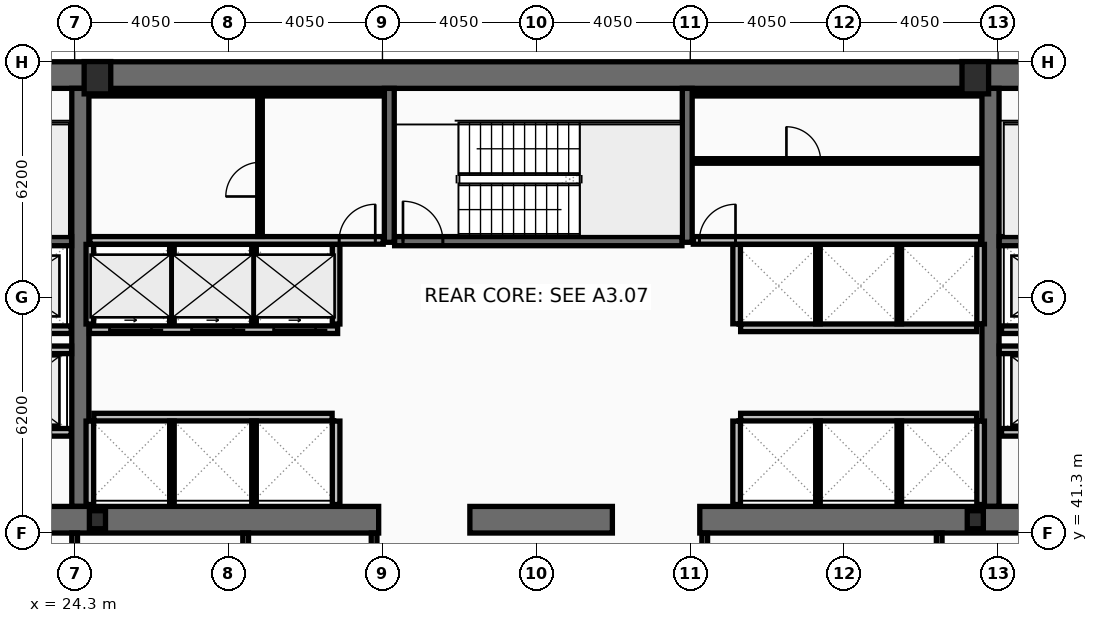
"""IFC4 building model, lengths in metres.
Left out: names, types, materials, properties, quantities, classifications, styles, units other than length and angle.
Written with IfcOpenShell. Run it as: python <this file> out.ifc"""

import sys

from ifc_helpers import new_model, si_unit, direction, frame, frame_2d, origin, origin_2d, place, context, subcontext, project, spatial, rectangle, hollow_rectangle, i_section, extrude, element, fill, save


model = new_model("IFC4")
c1 = context("Model", 3, precision=1e-05, world=origin(), true_north=direction((0.0, 1.0)))
c2 = subcontext(c1, "Body", "Model", "MODEL_VIEW")
j1 = project(units=[si_unit("LENGTHUNIT", "METRE"), si_unit("PLANEANGLEUNIT", "RADIAN")], contexts=[c1])
p1 = place(None, origin())
s1 = spatial("IfcSite", under=j1, at=p1, CompositionType="ELEMENT")
p2 = place(p1, origin())
s2 = spatial("IfcBuilding", under=s1, at=p2, CompositionType="ELEMENT")
p3 = place(p2, frame((0.0, 0.0, 98.6)))
s3 = spatial("IfcBuildingStorey", under=s2, at=p3, CompositionType="ELEMENT", Elevation=98.6)
p4 = place(p3, frame((16.2, 53.35, 0.0), z_axis=(0.0, 0.0, 1.0), x_axis=(1.0, 0.0, 0.0)))
e1 = element("IfcWall", 1, at=p4, inside=s3, PredefinedType="SHEAR", context=c2, shape_type="SweptSolid", body=[
    extrude(rectangle(XDim=40.5, YDim=0.7, at=frame_2d((20.25, 0.0))), origin(), (0.0, 0.0, 1.0), 3.82),
])
for number, where, z_axis, x_axis in (
    (2, (24.45, 42.0, 0.0), (0.0, 0.0, 1.0), (0.0, 1.0, 0.0)),
    (3, (48.4, 42.0, 0.0), (0.0, 0.0, 1.0), (0.0, 1.0, 0.0)),
):
    element("IfcWall", number, at=place(p3, frame(where, z_axis=z_axis, x_axis=x_axis)), inside=s3, PredefinedType="SHEAR", context=c2, shape_type="SweptSolid", body=[
        extrude(rectangle(XDim=11.0, YDim=0.45, at=frame_2d((5.5, 0.0))), origin(), (0.0, 0.0, 1.0), 3.82),
    ])
p5 = place(p3, frame((32.3, 41.65, 0.0), z_axis=(0.0, 0.0, 1.0), x_axis=(-1.0, 0.0, 0.0)))
e4 = element("IfcWall", 4, at=p5, inside=s3, PredefinedType="SHEAR", context=c2, shape_type="SweptSolid", body=[
    extrude(rectangle(XDim=11.45, YDim=0.7, at=frame_2d((5.725, 0.0))), origin(), (0.0, 0.0, 1.0), 3.82),
])
p6 = place(p3, frame((38.45, 41.65, 0.0), z_axis=(0.0, 0.0, 1.0), x_axis=(-1.0, 0.0, 0.0)))
e5 = element("IfcWall", 5, at=p6, inside=s3, PredefinedType="SHEAR", context=c2, shape_type="SweptSolid", body=[
    extrude(rectangle(XDim=3.75, YDim=0.7, at=frame_2d((1.875, 0.0))), origin(), (0.0, 0.0, 1.0), 3.82),
])
p7 = place(p3, frame((52.05, 41.65, 0.0), z_axis=(0.0, 0.0, 1.0), x_axis=(-1.0, 0.0, 0.0)))
e6 = element("IfcWall", 6, at=p7, inside=s3, PredefinedType="SHEAR", context=c2, shape_type="SweptSolid", body=[
    extrude(rectangle(XDim=11.3, YDim=0.7, at=frame_2d((5.65, 0.0))), origin(), (0.0, 0.0, 1.0), 3.82),
])
for number, where, z_axis, x_axis in (
    (7, (32.58, 48.95, 0.0), (0.0, 0.0, 1.0), (0.0, 1.0, 0.0)),
    (8, (40.42, 48.95, 0.0), (0.0, 0.0, 1.0), (0.0, 1.0, 0.0)),
):
    element("IfcWall", number, at=place(p3, frame(where, z_axis=z_axis, x_axis=x_axis)), inside=s3, PredefinedType="SHEAR", context=c2, shape_type="SweptSolid", body=[
        extrude(rectangle(XDim=4.05, YDim=0.26, at=frame_2d((2.025, 0.0))), origin(), (0.0, 0.0, 1.0), 3.82),
    ])
p8 = place(p3, frame((16.9, 48.98, 0.0), z_axis=(0.0, 0.0, 1.0), x_axis=(1.0, 0.0, 0.0)))
e9 = element("IfcWall", 9, at=p8, inside=s3, PredefinedType="SHEAR", context=c2, shape_type="SweptSolid", body=[
    extrude(rectangle(XDim=7.32, YDim=0.24, at=frame_2d((3.66, 0.0))), origin(), (0.0, 0.0, 1.0), 3.82),
])
p9 = place(p8, frame((0.22, 0.0, 0.0)))
e10 = element("IfcOpeningElement", 10, at=p9, cuts=e9, PredefinedType="OPENING", context=c2, shape_type="SweptSolid", body=[
    extrude(rectangle(XDim=1.05, YDim=2.15, at=frame_2d((0.525, 1.075))), frame((0.0, 0.13, 0.0), z_axis=(0.0, -1.0, 0.0), x_axis=(1.0, 0.0, 0.0)), (0.0, 0.0, 1.0), 0.26),
])
p10 = place(p3, frame((48.63, 48.98, 0.0), z_axis=(0.0, 0.0, 1.0), x_axis=(1.0, 0.0, 0.0)))
e11 = element("IfcWall", 11, at=p10, inside=s3, PredefinedType="SHEAR", context=c2, shape_type="SweptSolid", body=[
    extrude(rectangle(XDim=7.37, YDim=0.24, at=frame_2d((3.685, 0.0))), origin(), (0.0, 0.0, 1.0), 3.82),
])
p11 = place(p10, frame((6.1, 0.0, 0.0)))
e12 = element("IfcOpeningElement", 12, at=p11, cuts=e11, PredefinedType="OPENING", context=c2, shape_type="SweptSolid", body=[
    extrude(rectangle(XDim=1.05, YDim=2.15, at=frame_2d((0.525, 1.075))), frame((0.0, 0.13, 0.0), z_axis=(0.0, -1.0, 0.0), x_axis=(1.0, 0.0, 0.0)), (0.0, 0.0, 1.0), 0.26),
])
p12 = place(p3, frame((32.72, 48.98, 0.0), z_axis=(0.0, 0.0, 1.0), x_axis=(1.0, 0.0, 0.0)))
e13 = element("IfcWall", 13, at=p12, inside=s3, PredefinedType="SHEAR", context=c2, shape_type="SweptSolid", body=[
    extrude(rectangle(XDim=7.56, YDim=0.24, at=frame_2d((3.78, 0.0))), origin(), (0.0, 0.0, 1.0), 3.82),
])
p13 = place(p12, frame((0.22, 0.0, 0.0)))
e14 = element("IfcOpeningElement", 14, at=p13, cuts=e13, PredefinedType="OPENING", context=c2, shape_type="SweptSolid", body=[
    extrude(rectangle(XDim=1.05, YDim=2.15, at=frame_2d((0.525, 1.075))), frame((0.0, 0.13, 0.0), z_axis=(0.0, -1.0, 0.0), x_axis=(1.0, 0.0, 0.0)), (0.0, 0.0, 1.0), 0.26),
])
for number, where, z_axis, x_axis in (
    (15, (24.9, 53.28, 0.0), (0.0, 0.0, 1.0), (1.0, 0.0, 0.0)),
    (16, (48.0, 53.28, 0.0), (0.0, 0.0, 1.0), (1.0, 0.0, 0.0)),
):
    element("IfcColumn", number, at=place(p3, frame(where, z_axis=z_axis, x_axis=x_axis)), inside=s3, PredefinedType="COLUMN", context=c2, shape_type="SweptSolid", body=[
        extrude(hollow_rectangle(XDim=0.7, YDim=0.85, WallThickness=0.05, at=origin_2d()), origin(), (0.0, 0.0, 1.0), 4.0),
    ])
for number, where, z_axis, x_axis in (
    (17, (24.9, 41.65, 0.0), (0.0, 0.0, 1.0), (1.0, 0.0, 0.0)),
    (18, (48.0, 41.65, 0.0), (0.0, 0.0, 1.0), (1.0, 0.0, 0.0)),
):
    element("IfcColumn", number, at=place(p3, frame(where, z_axis=z_axis, x_axis=x_axis)), inside=s3, PredefinedType="COLUMN", context=c2, shape_type="SweptSolid", body=[
        extrude(i_section(OverallWidth=0.424, OverallDepth=0.474, WebThickness=0.048, FlangeThickness=0.077, at=origin_2d()), origin(), (0.0, 0.0, 1.0), 4.0),
    ])
p14 = place(p3, frame((51.61, 43.95, 0.0), z_axis=(0.0, 0.0, 1.0), x_axis=(-1.0, 0.0, 0.0)))
e19 = element("IfcWall", 19, at=p14, inside=s3, PredefinedType="PARTITIONING", context=c2, shape_type="SweptSolid", body=[
    extrude(rectangle(XDim=2.92, YDim=0.2, at=frame_2d((1.46, 0.0))), origin(), (0.0, 0.0, 1.0), 3.82),
])
p15 = place(p14, frame((0.81, 0.0, 0.0)))
e20 = element("IfcOpeningElement", 20, at=p15, cuts=e19, PredefinedType="OPENING", context=c2, shape_type="SweptSolid", body=[
    extrude(rectangle(XDim=1.3, YDim=2.18, at=frame_2d((0.65, 1.09))), frame((0.0, 0.11, 0.0), z_axis=(0.0, -1.0, 0.0), x_axis=(1.0, 0.0, 0.0)), (0.0, 0.0, 1.0), 0.22),
])
p16 = place(p3, frame((24.21, 43.95, 0.0), z_axis=(0.0, 0.0, 1.0), x_axis=(-1.0, 0.0, 0.0)))
e21 = element("IfcWall", 21, at=p16, inside=s3, PredefinedType="PARTITIONING", context=c2, shape_type="SweptSolid", body=[
    extrude(rectangle(XDim=2.97, YDim=0.2, at=frame_2d((1.485, 0.0))), origin(), (0.0, 0.0, 1.0), 3.82),
])
p17 = place(p16, frame((0.86, 0.0, 0.0)))
e22 = element("IfcOpeningElement", 22, at=p17, cuts=e21, PredefinedType="OPENING", context=c2, shape_type="SweptSolid", body=[
    extrude(rectangle(XDim=1.3, YDim=2.18, at=frame_2d((0.65, 1.09))), frame((0.0, 0.11, 0.0), z_axis=(0.0, -1.0, 0.0), x_axis=(1.0, 0.0, 0.0)), (0.0, 0.0, 1.0), 0.22),
])
p18 = place(p3, frame((51.61, 46.65, 0.0), z_axis=(0.0, 0.0, 1.0), x_axis=(-1.0, 0.0, 0.0)))
e23 = element("IfcWall", 23, at=p18, inside=s3, PredefinedType="PARTITIONING", context=c2, shape_type="SweptSolid", body=[
    extrude(rectangle(XDim=2.92, YDim=0.2, at=frame_2d((1.46, 0.0))), origin(), (0.0, 0.0, 1.0), 3.82),
])
p19 = place(p18, frame((0.86, 0.0, 0.0)))
e24 = element("IfcOpeningElement", 24, at=p19, cuts=e23, PredefinedType="OPENING", context=c2, shape_type="SweptSolid", body=[
    extrude(rectangle(XDim=1.2, YDim=2.18, at=frame_2d((0.6, 1.09))), frame((0.0, 0.11, 0.0), z_axis=(0.0, -1.0, 0.0), x_axis=(1.0, 0.0, 0.0)), (0.0, 0.0, 1.0), 0.22),
])
p20 = place(p3, frame((24.21, 46.65, 0.0), z_axis=(0.0, 0.0, 1.0), x_axis=(-1.0, 0.0, 0.0)))
e25 = element("IfcWall", 25, at=p20, inside=s3, PredefinedType="PARTITIONING", context=c2, shape_type="SweptSolid", body=[
    extrude(rectangle(XDim=2.97, YDim=0.2, at=frame_2d((1.485, 0.0))), origin(), (0.0, 0.0, 1.0), 3.82),
])
p21 = place(p20, frame((0.91, 0.0, 0.0)))
e26 = element("IfcOpeningElement", 26, at=p21, cuts=e25, PredefinedType="OPENING", context=c2, shape_type="SweptSolid", body=[
    extrude(rectangle(XDim=1.2, YDim=2.18, at=frame_2d((0.6, 1.09))), frame((0.0, 0.11, 0.0), z_axis=(0.0, -1.0, 0.0), x_axis=(1.0, 0.0, 0.0)), (0.0, 0.0, 1.0), 0.22),
])
p22 = place(p3, frame((31.22, 46.65, 0.0), z_axis=(0.0, 0.0, 1.0), x_axis=(-1.0, 0.0, 0.0)))
e27 = element("IfcWall", 27, at=p22, inside=s3, PredefinedType="PARTITIONING", context=c2, shape_type="SweptSolid", body=[
    extrude(rectangle(XDim=6.53, YDim=0.2, at=frame_2d((3.265, 0.0))), origin(), (0.0, 0.0, 1.0), 3.82),
])
p23 = place(p22, frame((4.9, 0.0, 0.0)))
e28 = element("IfcOpeningElement", 28, at=p23, cuts=e27, PredefinedType="OPENING", context=c2, shape_type="SweptSolid", body=[
    extrude(rectangle(XDim=1.1, YDim=2.18, at=frame_2d((0.55, 1.09))), frame((0.0, 0.11, 0.0), z_axis=(0.0, -1.0, 0.0), x_axis=(1.0, 0.0, 0.0)), (0.0, 0.0, 1.0), 0.22),
])
p24 = place(p22, frame((2.74, 0.0, 0.0)))
e29 = element("IfcOpeningElement", 29, at=p24, cuts=e27, PredefinedType="OPENING", context=c2, shape_type="SweptSolid", body=[
    extrude(rectangle(XDim=1.1, YDim=2.18, at=frame_2d((0.55, 1.09))), frame((0.0, 0.11, 0.0), z_axis=(0.0, -1.0, 0.0), x_axis=(1.0, 0.0, 0.0)), (0.0, 0.0, 1.0), 0.22),
])
p25 = place(p22, frame((0.58, 0.0, 0.0)))
e30 = element("IfcOpeningElement", 30, at=p25, cuts=e27, PredefinedType="OPENING", context=c2, shape_type="SweptSolid", body=[
    extrude(rectangle(XDim=1.1, YDim=2.18, at=frame_2d((0.55, 1.09))), frame((0.0, 0.11, 0.0), z_axis=(0.0, -1.0, 0.0), x_axis=(1.0, 0.0, 0.0)), (0.0, 0.0, 1.0), 0.22),
])
p26 = place(p3, frame((21.2, 46.12, 0.0), z_axis=(0.0, 0.0, 1.0), x_axis=(1.0, 0.0, 0.0)))
e31 = element("IfcWall", 31, at=p26, inside=s3, PredefinedType="PARTITIONING", context=c2, shape_type="SweptSolid", body=[
    extrude(rectangle(XDim=3.02, YDim=0.2, at=frame_2d((1.51, 0.0))), origin(), (0.0, 0.0, 1.0), 3.82),
])
p27 = place(p3, frame((48.63, 46.12, 0.0), z_axis=(0.0, 0.0, 1.0), x_axis=(1.0, 0.0, 0.0)))
e32 = element("IfcWall", 32, at=p27, inside=s3, PredefinedType="PARTITIONING", context=c2, shape_type="SweptSolid", body=[
    extrude(rectangle(XDim=3.07, YDim=0.2, at=frame_2d((1.535, 0.0))), origin(), (0.0, 0.0, 1.0), 3.82),
])
for number, where, z_axis, x_axis in (
    (33, (24.7, 46.8, 0.0), (0.0, 0.0, 1.0), (0.0, 1.0, 0.0)),
    (34, (31.18, 46.8, 0.0), (0.0, 0.0, 1.0), (0.0, 1.0, 0.0)),
):
    element("IfcWall", number, at=place(p3, frame(where, z_axis=z_axis, x_axis=x_axis)), inside=s3, PredefinedType="PARTITIONING", context=c2, shape_type="SweptSolid", body=[
        extrude(rectangle(XDim=2.095, YDim=0.2, at=frame_2d((1.047, 0.0))), origin(), (0.0, 0.0, 1.0), 3.82),
    ])
for number, where, z_axis, x_axis in (
    (35, (26.86, 46.8, 0.0), (0.0, 0.0, 1.0), (0.0, 1.0, 0.0)),
    (36, (29.02, 46.8, 0.0), (0.0, 0.0, 1.0), (0.0, 1.0, 0.0)),
):
    element("IfcWall", number, at=place(p3, frame(where, z_axis=z_axis, x_axis=x_axis)), inside=s3, PredefinedType="PARTITIONING", context=c2, shape_type="SweptSolid", body=[
        extrude(rectangle(XDim=2.095, YDim=0.12, at=frame_2d((1.047, 0.0))), origin(), (0.0, 0.0, 1.0), 3.82),
    ])
p28 = place(p3, frame((24.805, 44.35, 0.0), z_axis=(0.0, 0.0, 1.0), x_axis=(1.0, 0.0, 0.0)))
e37 = element("IfcWall", 37, at=p28, inside=s3, PredefinedType="PARTITIONING", context=c2, shape_type="SweptSolid", body=[
    extrude(rectangle(XDim=6.27, YDim=0.2, at=frame_2d((3.135, 0.0))), origin(), (0.0, 0.0, 1.0), 3.82),
])
for number, where, z_axis, x_axis in (
    (38, (24.7, 42.05, 0.0), (0.0, 0.0, 1.0), (0.0, 1.0, 0.0)),
    (39, (31.18, 42.05, 0.0), (0.0, 0.0, 1.0), (0.0, 1.0, 0.0)),
):
    element("IfcWall", number, at=place(p3, frame(where, z_axis=z_axis, x_axis=x_axis)), inside=s3, PredefinedType="PARTITIONING", context=c2, shape_type="SweptSolid", body=[
        extrude(rectangle(XDim=2.195, YDim=0.2, at=frame_2d((1.098, 0.0))), origin(), (0.0, 0.0, 1.0), 3.82),
    ])
for number, where, z_axis, x_axis in (
    (40, (26.86, 42.05, 0.0), (0.0, 0.0, 1.0), (0.0, 1.0, 0.0)),
    (41, (29.02, 42.05, 0.0), (0.0, 0.0, 1.0), (0.0, 1.0, 0.0)),
):
    element("IfcWall", number, at=place(p3, frame(where, z_axis=z_axis, x_axis=x_axis)), inside=s3, PredefinedType="PARTITIONING", context=c2, shape_type="SweptSolid", body=[
        extrude(rectangle(XDim=2.195, YDim=0.12, at=frame_2d((1.098, 0.0))), origin(), (0.0, 0.0, 1.0), 3.82),
    ])
p29 = place(p3, frame((41.825, 46.7, 0.0), z_axis=(0.0, 0.0, 1.0), x_axis=(1.0, 0.0, 0.0)))
e42 = element("IfcWall", 42, at=p29, inside=s3, PredefinedType="PARTITIONING", context=c2, shape_type="SweptSolid", body=[
    extrude(rectangle(XDim=6.21, YDim=0.2, at=frame_2d((3.105, 0.0))), origin(), (0.0, 0.0, 1.0), 3.82),
])
for number, where, z_axis, x_axis in (
    (43, (41.72, 46.805, 0.0), (0.0, 0.0, 1.0), (0.0, 1.0, 0.0)),
    (44, (48.14, 46.805, 0.0), (0.0, 0.0, 1.0), (0.0, 1.0, 0.0)),
):
    element("IfcWall", number, at=place(p3, frame(where, z_axis=z_axis, x_axis=x_axis)), inside=s3, PredefinedType="PARTITIONING", context=c2, shape_type="SweptSolid", body=[
        extrude(rectangle(XDim=2.09, YDim=0.2, at=frame_2d((1.045, 0.0))), origin(), (0.0, 0.0, 1.0), 3.82),
    ])
for number, where, z_axis, x_axis in (
    (45, (43.86, 46.805, 0.0), (0.0, 0.0, 1.0), (0.0, 1.0, 0.0)),
    (46, (46.0, 46.805, 0.0), (0.0, 0.0, 1.0), (0.0, 1.0, 0.0)),
):
    element("IfcWall", number, at=place(p3, frame(where, z_axis=z_axis, x_axis=x_axis)), inside=s3, PredefinedType="PARTITIONING", context=c2, shape_type="SweptSolid", body=[
        extrude(rectangle(XDim=2.09, YDim=0.12, at=frame_2d((1.045, 0.0))), origin(), (0.0, 0.0, 1.0), 3.82),
    ])
p30 = place(p3, frame((41.825, 44.35, 0.0), z_axis=(0.0, 0.0, 1.0), x_axis=(1.0, 0.0, 0.0)))
e47 = element("IfcWall", 47, at=p30, inside=s3, PredefinedType="PARTITIONING", context=c2, shape_type="SweptSolid", body=[
    extrude(rectangle(XDim=6.21, YDim=0.2, at=frame_2d((3.105, 0.0))), origin(), (0.0, 0.0, 1.0), 3.82),
])
for number, where, z_axis, x_axis in (
    (48, (41.72, 42.05, 0.0), (0.0, 0.0, 1.0), (0.0, 1.0, 0.0)),
    (49, (48.14, 42.05, 0.0), (0.0, 0.0, 1.0), (0.0, 1.0, 0.0)),
):
    element("IfcWall", number, at=place(p3, frame(where, z_axis=z_axis, x_axis=x_axis)), inside=s3, PredefinedType="PARTITIONING", context=c2, shape_type="SweptSolid", body=[
        extrude(rectangle(XDim=2.195, YDim=0.2, at=frame_2d((1.098, 0.0))), origin(), (0.0, 0.0, 1.0), 3.82),
    ])
for number, where, z_axis, x_axis in (
    (50, (43.86, 42.05, 0.0), (0.0, 0.0, 1.0), (0.0, 1.0, 0.0)),
    (51, (46.0, 42.05, 0.0), (0.0, 0.0, 1.0), (0.0, 1.0, 0.0)),
):
    element("IfcWall", number, at=place(p3, frame(where, z_axis=z_axis, x_axis=x_axis)), inside=s3, PredefinedType="PARTITIONING", context=c2, shape_type="SweptSolid", body=[
        extrude(rectangle(XDim=2.195, YDim=0.12, at=frame_2d((1.098, 0.0))), origin(), (0.0, 0.0, 1.0), 3.82),
    ])
p31 = place(p3, frame((24.7, 52.86, 0.0), z_axis=(0.0, 0.0, 1.0), x_axis=(1.0, 0.0, 0.0)))
e52 = element("IfcWall", 52, at=p31, inside=s3, PredefinedType="PARTITIONING", context=c2, shape_type="SweptSolid", body=[
    extrude(rectangle(XDim=7.72, YDim=0.12, at=frame_2d((3.86, 0.0))), origin(), (0.0, 0.0, 1.0), 3.82),
])
p32 = place(p3, frame((24.7, 49.0, 0.0), z_axis=(0.0, 0.0, 1.0), x_axis=(1.0, 0.0, 0.0)))
e53 = element("IfcWall", 53, at=p32, inside=s3, PredefinedType="PARTITIONING", context=c2, shape_type="SweptSolid", body=[
    extrude(rectangle(XDim=7.72, YDim=0.2, at=frame_2d((3.86, 0.0))), origin(), (0.0, 0.0, 1.0), 3.82),
])
p33 = place(p32, frame((6.56, 0.0, 0.0)))
e54 = element("IfcOpeningElement", 54, at=p33, cuts=e53, PredefinedType="OPENING", context=c2, shape_type="SweptSolid", body=[
    extrude(rectangle(XDim=0.95, YDim=2.1, at=frame_2d((0.475, 1.05))), frame((0.0, 0.11, 0.0), z_axis=(0.0, -1.0, 0.0), x_axis=(1.0, 0.0, 0.0)), (0.0, 0.0, 1.0), 0.22),
])
p34 = place(p3, frame((29.177, 49.105, 0.0), z_axis=(0.0, 0.0, 1.0), x_axis=(0.0, 1.0, 0.0)))
e55 = element("IfcWall", 55, at=p34, inside=s3, PredefinedType="PARTITIONING", context=c2, shape_type="SweptSolid", body=[
    extrude(rectangle(XDim=3.69, YDim=0.12, at=frame_2d((1.845, 0.0))), origin(), (0.0, 0.0, 1.0), 3.82),
])
p35 = place(p34, frame((1.05, 0.0, 0.0)))
e56 = element("IfcOpeningElement", 56, at=p35, cuts=e55, PredefinedType="OPENING", context=c2, shape_type="SweptSolid", body=[
    extrude(rectangle(XDim=0.9, YDim=2.05, at=frame_2d((0.45, 1.025))), frame((0.0, 0.07, 0.0), z_axis=(0.0, -1.0, 0.0), x_axis=(1.0, 0.0, 0.0)), (0.0, 0.0, 1.0), 0.14),
])
p36 = place(p3, frame((40.58, 52.86, 0.0), z_axis=(0.0, 0.0, 1.0), x_axis=(1.0, 0.0, 0.0)))
e57 = element("IfcWall", 57, at=p36, inside=s3, PredefinedType="PARTITIONING", context=c2, shape_type="SweptSolid", body=[
    extrude(rectangle(XDim=7.56, YDim=0.12, at=frame_2d((3.78, 0.0))), origin(), (0.0, 0.0, 1.0), 3.82),
])
p37 = place(p3, frame((40.58, 49.0, 0.0), z_axis=(0.0, 0.0, 1.0), x_axis=(1.0, 0.0, 0.0)))
e58 = element("IfcWall", 58, at=p37, inside=s3, PredefinedType="PARTITIONING", context=c2, shape_type="SweptSolid", body=[
    extrude(rectangle(XDim=7.56, YDim=0.2, at=frame_2d((3.78, 0.0))), origin(), (0.0, 0.0, 1.0), 3.82),
])
p38 = place(p37, frame((0.16, 0.0, 0.0)))
e59 = element("IfcOpeningElement", 59, at=p38, cuts=e58, PredefinedType="OPENING", context=c2, shape_type="SweptSolid", body=[
    extrude(rectangle(XDim=0.95, YDim=2.1, at=frame_2d((0.475, 1.05))), frame((0.0, 0.11, 0.0), z_axis=(0.0, -1.0, 0.0), x_axis=(1.0, 0.0, 0.0)), (0.0, 0.0, 1.0), 0.22),
])
p39 = place(p3, frame((40.63, 51.09, 0.0), z_axis=(0.0, 0.0, 1.0), x_axis=(1.0, 0.0, 0.0)))
e60 = element("IfcWall", 60, at=p39, inside=s3, PredefinedType="PARTITIONING", context=c2, shape_type="SweptSolid", body=[
    extrude(rectangle(XDim=7.46, YDim=0.12, at=frame_2d((3.73, 0.0))), origin(), (0.0, 0.0, 1.0), 3.82),
])
p40 = place(p39, frame((2.4, 0.0, 0.0)))
e61 = element("IfcOpeningElement", 61, at=p40, cuts=e60, PredefinedType="OPENING", context=c2, shape_type="SweptSolid", body=[
    extrude(rectangle(XDim=0.9, YDim=2.05, at=frame_2d((0.45, 1.025))), frame((0.0, 0.07, 0.0), z_axis=(0.0, -1.0, 0.0), x_axis=(1.0, 0.0, 0.0)), (0.0, 0.0, 1.0), 0.14),
])
for number, where, z_axis, x_axis in (
    (62, (24.3, 38.28, 0.0), (0.0, 0.0, 1.0), (0.0, 1.0, 0.0)),
    (63, (28.8, 38.28, 0.0), (0.0, 0.0, 1.0), (0.0, 1.0, 0.0)),
    (64, (32.18, 38.28, 0.0), (0.0, 0.0, 1.0), (0.0, 1.0, 0.0)),
    (65, (40.88, 38.28, 0.0), (0.0, 0.0, 1.0), (0.0, 1.0, 0.0)),
    (66, (47.05, 38.28, 0.0), (0.0, 0.0, 1.0), (0.0, 1.0, 0.0)),
):
    element("IfcWall", number, at=place(p3, frame(where, z_axis=z_axis, x_axis=x_axis)), inside=s3, PredefinedType="PARTITIONING", context=c2, shape_type="SweptSolid", body=[
        extrude(rectangle(XDim=3.02, YDim=0.15, at=frame_2d((1.51, 0.0))), origin(), (0.0, 0.0, 1.0), 3.82),
    ])
p41 = place(p13, origin())
e67 = element("IfcDoor", 67, at=p41, inside=s3, OperationType="SINGLE_SWING_LEFT", PredefinedType="DOOR", context=c2, shape_type="SweptSolid", body=[
    extrude(rectangle(XDim=1.05, YDim=2.15, at=frame_2d((0.525, 1.075))), frame((0.0, 0.025, 0.0), z_axis=(0.0, -1.0, 0.0), x_axis=(1.0, 0.0, 0.0)), (0.0, 0.0, 1.0), 0.05),
])
fill(e14, e67)
p42 = place(p23, origin())
e68 = element("IfcDoor", 68, at=p42, inside=s3, OperationType="SLIDING_TO_LEFT", PredefinedType="DOOR", context=c2, shape_type="SweptSolid", body=[
    extrude(rectangle(XDim=1.1, YDim=2.18, at=frame_2d((0.55, 1.09))), frame((0.0, 0.025, 0.0), z_axis=(0.0, -1.0, 0.0), x_axis=(1.0, 0.0, 0.0)), (0.0, 0.0, 1.0), 0.05),
])
fill(e28, e68)
p43 = place(p24, origin())
e69 = element("IfcDoor", 69, at=p43, inside=s3, OperationType="SLIDING_TO_LEFT", PredefinedType="DOOR", context=c2, shape_type="SweptSolid", body=[
    extrude(rectangle(XDim=1.1, YDim=2.18, at=frame_2d((0.55, 1.09))), frame((0.0, 0.025, 0.0), z_axis=(0.0, -1.0, 0.0), x_axis=(1.0, 0.0, 0.0)), (0.0, 0.0, 1.0), 0.05),
])
fill(e29, e69)
p44 = place(p25, origin())
e70 = element("IfcDoor", 70, at=p44, inside=s3, OperationType="SLIDING_TO_LEFT", PredefinedType="DOOR", context=c2, shape_type="SweptSolid", body=[
    extrude(rectangle(XDim=1.1, YDim=2.18, at=frame_2d((0.55, 1.09))), frame((0.0, 0.025, 0.0), z_axis=(0.0, -1.0, 0.0), x_axis=(1.0, 0.0, 0.0)), (0.0, 0.0, 1.0), 0.05),
])
fill(e30, e70)
p45 = place(p33, origin())
e71 = element("IfcDoor", 71, at=p45, inside=s3, OperationType="SINGLE_SWING_RIGHT", PredefinedType="DOOR", context=c2, shape_type="SweptSolid", body=[
    extrude(rectangle(XDim=0.95, YDim=2.1, at=frame_2d((0.475, 1.05))), frame((0.0, 0.025, 0.0), z_axis=(0.0, -1.0, 0.0), x_axis=(1.0, 0.0, 0.0)), (0.0, 0.0, 1.0), 0.05),
])
fill(e54, e71)
p46 = place(p35, origin())
e72 = element("IfcDoor", 72, at=p46, inside=s3, OperationType="SINGLE_SWING_LEFT", PredefinedType="DOOR", context=c2, shape_type="SweptSolid", body=[
    extrude(rectangle(XDim=0.9, YDim=2.05, at=frame_2d((0.45, 1.025))), frame((0.0, 0.025, 0.0), z_axis=(0.0, -1.0, 0.0), x_axis=(1.0, 0.0, 0.0)), (0.0, 0.0, 1.0), 0.05),
])
fill(e56, e72)
p47 = place(p38, origin())
e73 = element("IfcDoor", 73, at=p47, inside=s3, OperationType="SINGLE_SWING_RIGHT", PredefinedType="DOOR", context=c2, shape_type="SweptSolid", body=[
    extrude(rectangle(XDim=0.95, YDim=2.1, at=frame_2d((0.475, 1.05))), frame((0.0, 0.025, 0.0), z_axis=(0.0, -1.0, 0.0), x_axis=(1.0, 0.0, 0.0)), (0.0, 0.0, 1.0), 0.05),
])
fill(e59, e73)
p48 = place(p40, origin())
e74 = element("IfcDoor", 74, at=p48, inside=s3, OperationType="SINGLE_SWING_LEFT", PredefinedType="DOOR", context=c2, shape_type="SweptSolid", body=[
    extrude(rectangle(XDim=0.9, YDim=2.05, at=frame_2d((0.45, 1.025))), frame((0.0, 0.025, 0.0), z_axis=(0.0, -1.0, 0.0), x_axis=(1.0, 0.0, 0.0)), (0.0, 0.0, 1.0), 0.05),
])
fill(e61, e74)
save(model, sys.argv[1])
